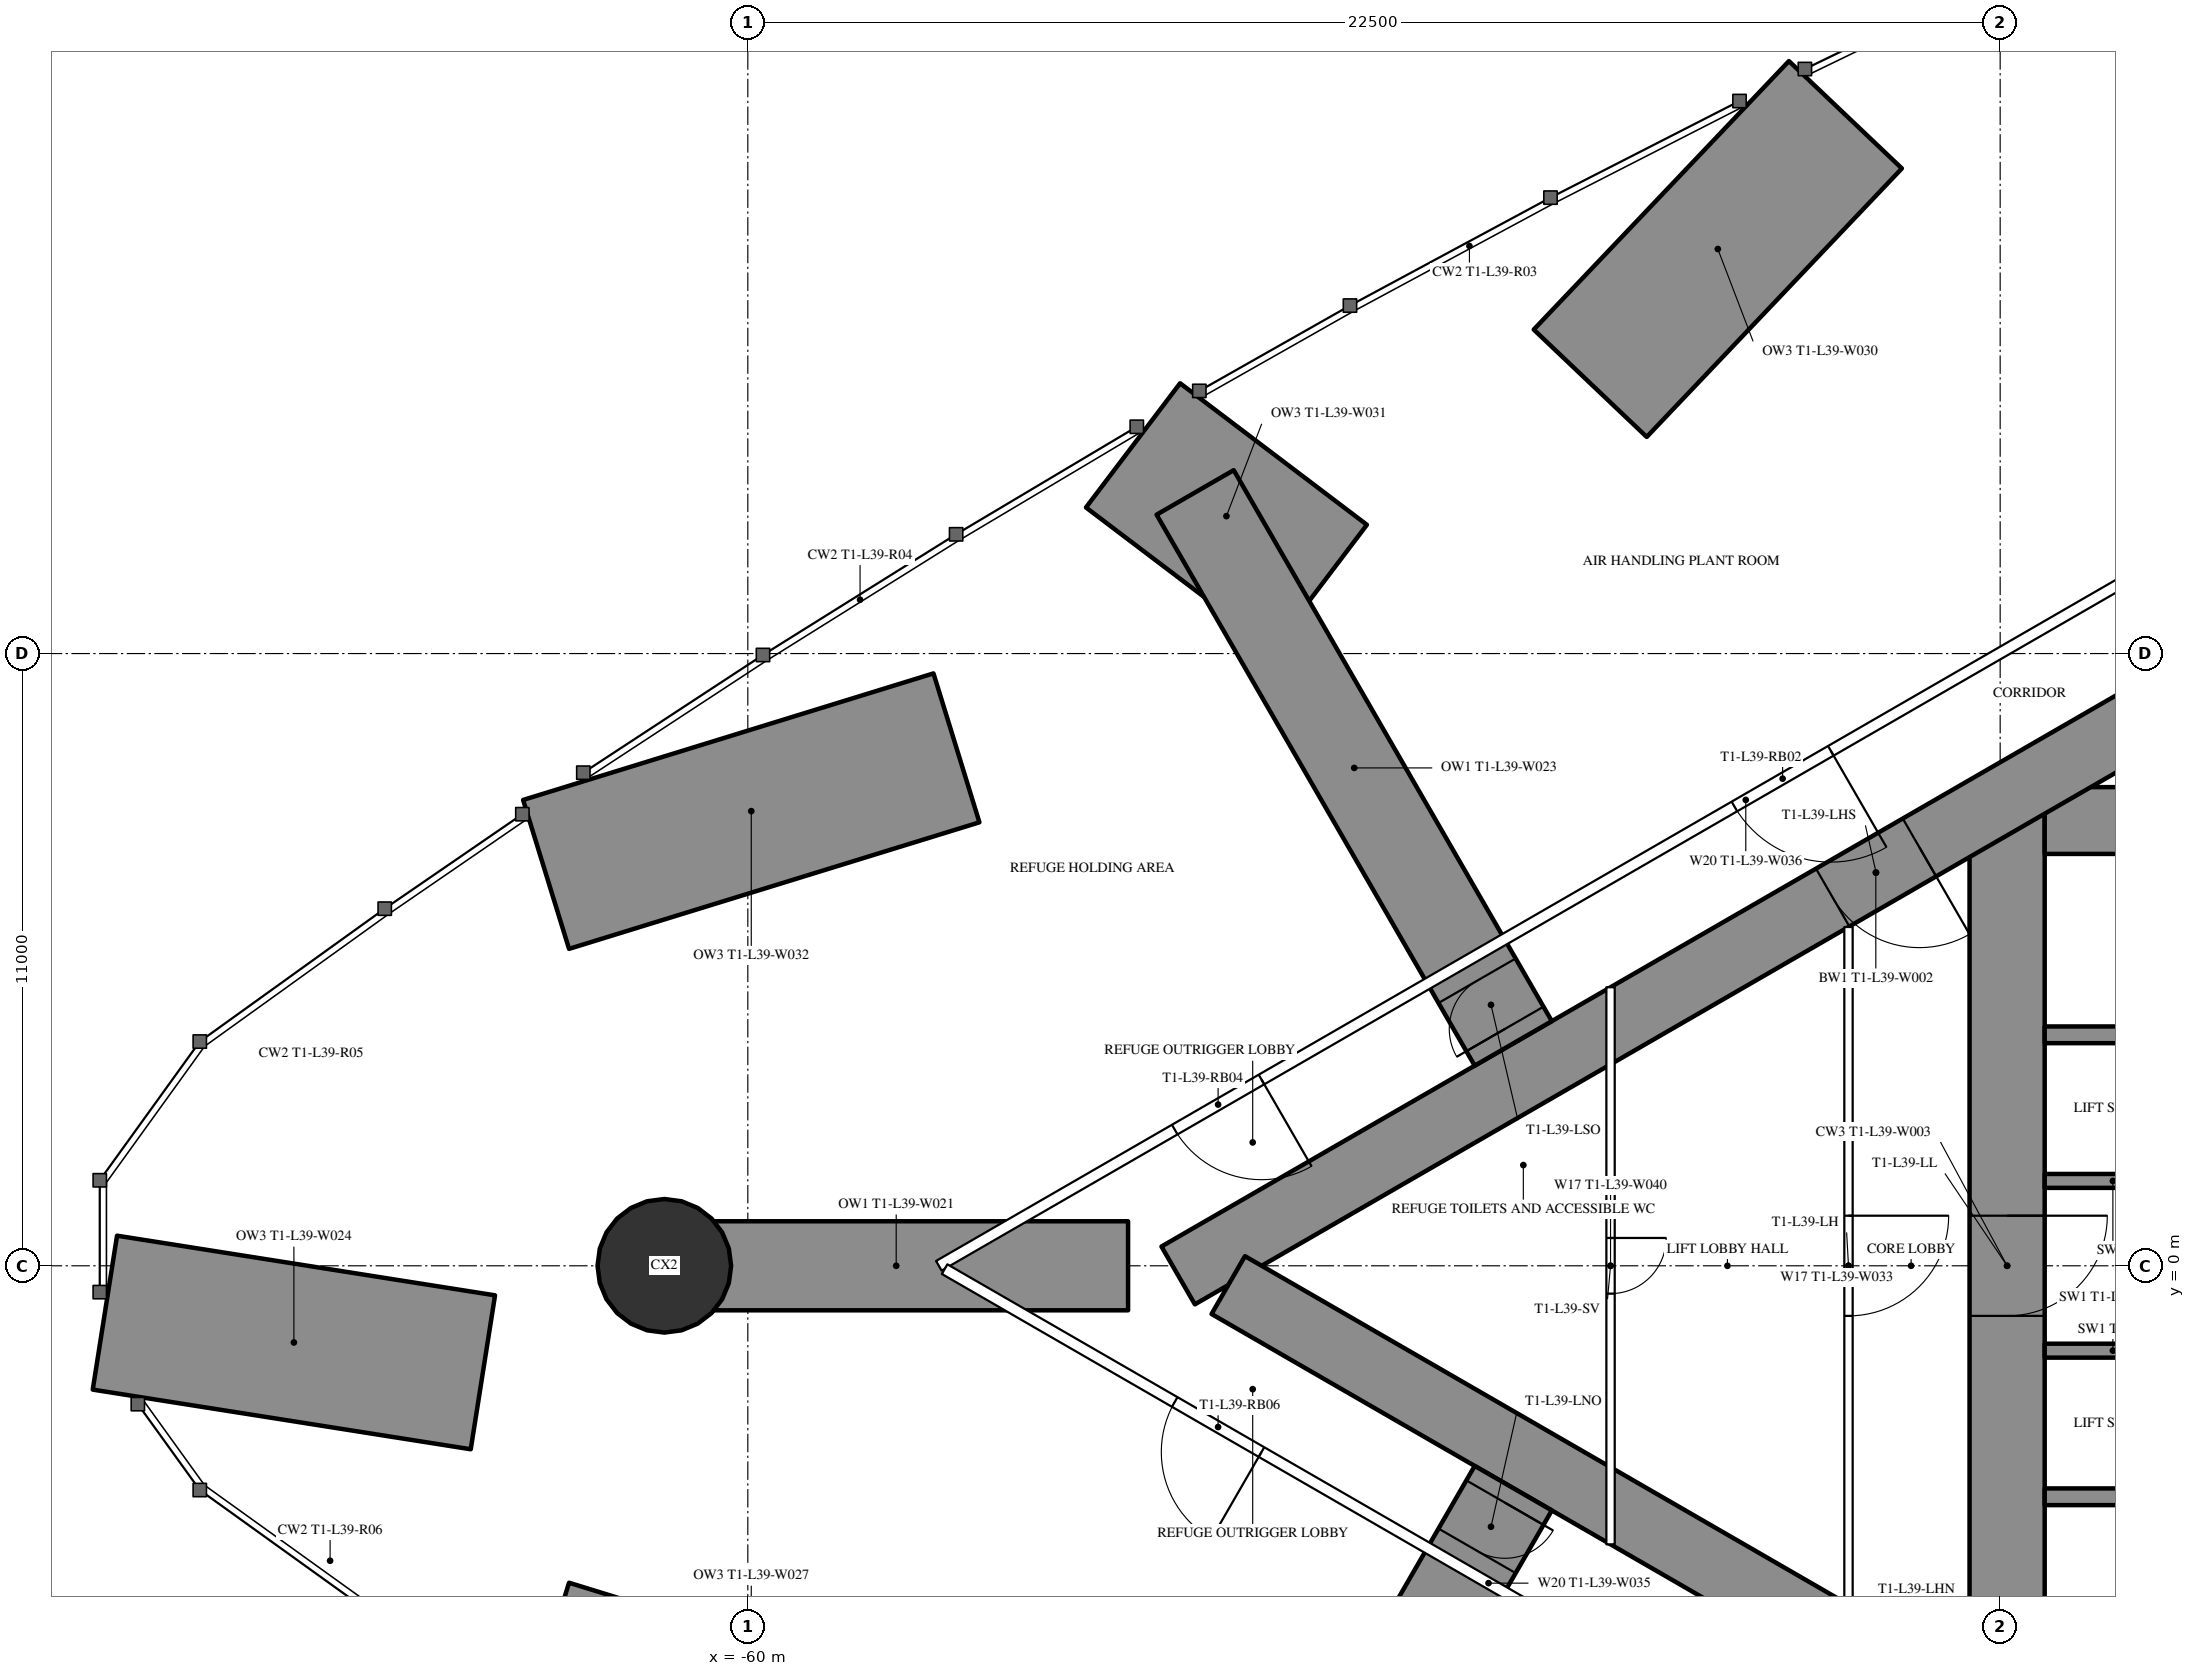
"""IFC4 building model, lengths in metres.
Left out: names, types, materials, properties, quantities, classifications, styles, units other than length and angle.
Written with IfcOpenShell. Run it as: python <this file> out.ifc"""

import sys

from ifc_helpers import new_model, si_unit, direction, frame, frame_2d, origin, origin_2d, place, context, subcontext, project, spatial, rectangle, circle, extrude, element, fill, save


model = new_model("IFC4")
c1 = context("Model", 3, precision=1e-05, world=origin(), true_north=direction((0.0, 1.0)))
c2 = subcontext(c1, "Body", "Model", "MODEL_VIEW")
j1 = project(units=[si_unit("LENGTHUNIT", "METRE"), si_unit("PLANEANGLEUNIT", "RADIAN")], contexts=[c1])
p1 = place(None, origin())
s1 = spatial("IfcSite", under=j1, at=p1, CompositionType="ELEMENT")
p2 = place(p1, origin())
s2 = spatial("IfcBuilding", under=s1, at=p2, CompositionType="ELEMENT")
p3 = place(p2, frame((0.0, 0.0, 146.7)))
s3 = spatial("IfcBuildingStorey", under=s2, at=p3, CompositionType="ELEMENT", Elevation=146.7)
p4 = place(p3, frame((-71.551, -0.842, 0.0), z_axis=(0.0, 0.0, 1.0), x_axis=(0.987774767093, -0.155887810603, 0.0)))
e1 = element("IfcWall", 1, at=p4, inside=s3, PredefinedType="SHEAR", context=c2, shape_type="SweptSolid", body=[
    extrude(rectangle(XDim=6.875, YDim=2.8, at=frame_2d((3.438, 0.0))), origin(), (0.0, 0.0, 1.0), 6.0),
])
p5 = place(p3, frame((-63.625, -7.032, 0.0), z_axis=(0.0, 0.0, 1.0), x_axis=(0.955592035737, -0.29469282522, 0.0)))
e2 = element("IfcWall", 2, at=p5, inside=s3, PredefinedType="SHEAR", context=c2, shape_type="SweptSolid", body=[
    extrude(rectangle(XDim=7.715, YDim=2.8, at=frame_2d((3.858, 0.0))), origin(), (0.0, 0.0, 1.0), 6.0),
])
p6 = place(p3, frame((-40.281, 20.681, 0.0), z_axis=(0.0, 0.0, 1.0), x_axis=(-0.688883466121, -0.724872106033, 0.0)))
e3 = element("IfcWall", 3, at=p6, inside=s3, PredefinedType="SHEAR", context=c2, shape_type="SweptSolid", body=[
    extrude(rectangle(XDim=6.655, YDim=2.8, at=frame_2d((3.328, 0.0))), origin(), (0.0, 0.0, 1.0), 6.0),
])
p7 = place(p3, frame((-53.079, 14.74, 0.0), z_axis=(0.0, 0.0, 1.0), x_axis=(0.797075233676, -0.603880014457, 0.0)))
e4 = element("IfcWall", 4, at=p7, inside=s3, PredefinedType="SHEAR", context=c2, shape_type="SweptSolid", body=[
    extrude(rectangle(XDim=4.211, YDim=2.8, at=frame_2d((2.105, 0.0))), origin(), (0.0, 0.0, 1.0), 6.0),
])
p8 = place(p3, frame((-63.625, 7.032, 0.0), z_axis=(0.0, 0.0, 1.0), x_axis=(0.955592035737, 0.29469282522, 0.0)))
e5 = element("IfcWall", 5, at=p8, inside=s3, PredefinedType="SHEAR", context=c2, shape_type="SweptSolid", body=[
    extrude(rectangle(XDim=7.715, YDim=2.8, at=frame_2d((3.858, 0.0))), origin(), (0.0, 0.0, 1.0), 6.0),
])
p9 = place(p3, frame((-61.5, 0.0, 0.0), z_axis=(0.0, 0.0, 1.0), x_axis=(1.0, 0.0, 0.0)))
e6 = element("IfcColumn", 6, at=p9, inside=s3, PredefinedType="COLUMN", context=c2, shape_type="SweptSolid", body=[
    extrude(circle(Radius=1.2, at=origin_2d()), origin(), (0.0, 0.0, 1.0), 6.0),
])
p10 = place(p3, frame((-37.375, 8.6, 0.0), z_axis=(0.0, 0.0, 1.0), x_axis=(0.0, -1.0, 0.0)))
e7 = element("IfcWall", 7, at=p10, inside=s3, PredefinedType="SHEAR", context=c2, shape_type="SweptSolid", body=[
    extrude(rectangle(XDim=17.2, YDim=1.35, at=frame_2d((8.6, 0.0))), origin(), (0.0, 0.0, 1.0), 6.0),
])
p11 = place(p10, frame((7.7, 0.0, 0.0)))
e8 = element("IfcOpeningElement", 8, at=p11, cuts=e7, PredefinedType="OPENING", context=c2, shape_type="SweptSolid", body=[
    extrude(rectangle(XDim=1.8, YDim=2.2, at=frame_2d((0.9, 1.1))), frame((0.0, 0.685, 0.0), z_axis=(0.0, -1.0, 0.0), x_axis=(1.0, 0.0, 0.0)), (0.0, 0.0, 1.0), 1.37),
])
p12 = place(p3, frame((-28.3, 8.0, 0.0), z_axis=(0.0, 0.0, 1.0), x_axis=(-1.0, 0.0, 0.0)))
e9 = element("IfcWall", 9, at=p12, inside=s3, PredefinedType="SHEAR", context=c2, shape_type="SweptSolid", body=[
    extrude(rectangle(XDim=8.4, YDim=1.2, at=frame_2d((4.2, 0.0))), origin(), (0.0, 0.0, 1.0), 6.0),
])
p13 = place(p12, frame((0.25, 0.0, 0.0)))
e10 = element("IfcOpeningElement", 10, at=p13, cuts=e9, PredefinedType="OPENING", context=c2, shape_type="SweptSolid", body=[
    extrude(rectangle(XDim=1.0, YDim=2.2, at=frame_2d((0.5, 1.1))), frame((0.0, 0.61, 0.0), z_axis=(0.0, -1.0, 0.0), x_axis=(1.0, 0.0, 0.0)), (0.0, 0.0, 1.0), 1.22),
])
for number, where, z_axis, x_axis in (
    (11, (-28.3, 4.15, 0.0), (0.0, 0.0, 1.0), (-1.0, 0.0, 0.0)),
    (12, (-28.3, -4.15, 0.0), (0.0, 0.0, 1.0), (-1.0, 0.0, 0.0)),
):
    element("IfcWall", number, at=place(p3, frame(where, z_axis=z_axis, x_axis=x_axis)), inside=s3, PredefinedType="SHEAR", context=c2, shape_type="SweptSolid", body=[
        extrude(rectangle(XDim=8.4, YDim=0.3, at=frame_2d((4.2, 0.0))), origin(), (0.0, 0.0, 1.0), 6.0),
    ])
for number, where, z_axis, x_axis in (
    (13, (-34.25, 1.525, 0.0), (0.0, 0.0, 1.0), (-1.0, 0.0, 0.0)),
    (14, (-34.25, -1.525, 0.0), (0.0, 0.0, 1.0), (-1.0, 0.0, 0.0)),
):
    element("IfcWall", number, at=place(p3, frame(where, z_axis=z_axis, x_axis=x_axis)), inside=s3, PredefinedType="SHEAR", context=c2, shape_type="SweptSolid", body=[
        extrude(rectangle(XDim=2.45, YDim=0.25, at=frame_2d((1.225, 0.0))), origin(), (0.0, 0.0, 1.0), 6.0),
    ])
p14 = place(p3, frame((-27.2, 14.3, 0.0), z_axis=(0.0, 0.0, 1.0), x_axis=(-0.866026593062, -0.499997940104, 0.0)))
e15 = element("IfcWall", 15, at=p14, inside=s3, PredefinedType="SHEAR", context=c2, shape_type="SweptSolid", body=[
    extrude(rectangle(XDim=28.946, YDim=1.2, at=frame_2d((14.473, 0.0))), origin(), (0.0, 0.0, 1.0), 6.0),
])
p15 = place(p14, frame((4.6, 0.0, 0.0)))
e16 = element("IfcOpeningElement", 16, at=p15, cuts=e15, PredefinedType="OPENING", context=c2, shape_type="SweptSolid", body=[
    extrude(rectangle(XDim=1.0, YDim=2.2, at=frame_2d((0.5, 1.1))), frame((0.0, 0.61, 0.0), z_axis=(0.0, -1.0, 0.0), x_axis=(1.0, 0.0, 0.0)), (0.0, 0.0, 1.0), 1.22),
])
p16 = place(p14, frame((13.568, 0.0, 0.0)))
e17 = element("IfcOpeningElement", 17, at=p16, cuts=e15, PredefinedType="OPENING", context=c2, shape_type="SweptSolid", body=[
    extrude(rectangle(XDim=1.8, YDim=2.2, at=frame_2d((0.9, 1.1))), frame((0.0, 0.61, 0.0), z_axis=(0.0, -1.0, 0.0), x_axis=(1.0, 0.0, 0.0)), (0.0, 0.0, 1.0), 1.22),
])
p17 = place(p3, frame((-27.2, -14.3, 0.0), z_axis=(0.0, 0.0, 1.0), x_axis=(-0.866024021859, 0.500002393557, 0.0)))
e18 = element("IfcWall", 18, at=p17, inside=s3, PredefinedType="SHEAR", context=c2, shape_type="SweptSolid", body=[
    extrude(rectangle(XDim=27.907, YDim=1.2, at=frame_2d((13.954, 0.0))), origin(), (0.0, 0.0, 1.0), 6.0),
])
p18 = place(p17, frame((4.6, 0.0, 0.0)))
e19 = element("IfcOpeningElement", 19, at=p18, cuts=e18, PredefinedType="OPENING", context=c2, shape_type="SweptSolid", body=[
    extrude(rectangle(XDim=1.0, YDim=2.2, at=frame_2d((0.5, 1.1))), frame((0.0, 0.61, 0.0), z_axis=(0.0, -1.0, 0.0), x_axis=(1.0, 0.0, 0.0)), (0.0, 0.0, 1.0), 1.22),
])
p19 = place(p17, frame((13.568, 0.0, 0.0)))
e20 = element("IfcOpeningElement", 20, at=p19, cuts=e18, PredefinedType="OPENING", context=c2, shape_type="SweptSolid", body=[
    extrude(rectangle(XDim=1.8, YDim=2.2, at=frame_2d((0.9, 1.1))), frame((0.0, 0.61, 0.0), z_axis=(0.0, -1.0, 0.0), x_axis=(1.0, 0.0, 0.0)), (0.0, 0.0, 1.0), 1.22),
])
p20 = place(p3, frame((-46.248, 3.996, 0.0), z_axis=(0.0, 0.0, 1.0), x_axis=(-0.499993613132, 0.866029091213, 0.0)))
e21 = element("IfcWall", 21, at=p20, inside=s3, PredefinedType="SHEAR", context=c2, shape_type="SweptSolid", body=[
    extrude(rectangle(XDim=11.431, YDim=1.6, at=frame_2d((5.715, 0.0))), origin(), (0.0, 0.0, 1.0), 6.0),
])
p21 = place(p20, frame((0.3, 0.0, 0.0)))
e22 = element("IfcOpeningElement", 22, at=p21, cuts=e21, PredefinedType="OPENING", context=c2, shape_type="SweptSolid", body=[
    extrude(rectangle(XDim=1.0, YDim=2.2, at=frame_2d((0.5, 1.1))), frame((0.0, 0.81, 0.0), z_axis=(0.0, -1.0, 0.0), x_axis=(1.0, 0.0, 0.0)), (0.0, 0.0, 1.0), 1.62),
])
p22 = place(p3, frame((-53.168, 0.0, 0.0), z_axis=(0.0, 0.0, 1.0), x_axis=(-1.0, 0.0, 0.0)))
e23 = element("IfcWall", 23, at=p22, inside=s3, PredefinedType="SHEAR", context=c2, shape_type="SweptSolid", body=[
    extrude(rectangle(XDim=8.332, YDim=1.6, at=frame_2d((4.166, 0.0))), origin(), (0.0, 0.0, 1.0), 6.0),
])
p23 = place(p3, frame((-46.248, -3.996, 0.0), z_axis=(0.0, 0.0, 1.0), x_axis=(-0.499993613132, -0.866029091213, 0.0)))
e24 = element("IfcWall", 24, at=p23, inside=s3, PredefinedType="SHEAR", context=c2, shape_type="SweptSolid", body=[
    extrude(rectangle(XDim=11.431, YDim=1.6, at=frame_2d((5.715, 0.0))), origin(), (0.0, 0.0, 1.0), 6.0),
])
p24 = place(p23, frame((0.3, 0.0, 0.0)))
e25 = element("IfcOpeningElement", 25, at=p24, cuts=e24, PredefinedType="OPENING", context=c2, shape_type="SweptSolid", body=[
    extrude(rectangle(XDim=1.0, YDim=2.2, at=frame_2d((0.5, 1.1))), frame((0.0, 0.81, 0.0), z_axis=(0.0, -1.0, 0.0), x_axis=(1.0, 0.0, 0.0)), (0.0, 0.0, 1.0), 1.62),
])
p25 = place(p3, frame((-27.572, 16.741, 0.0), z_axis=(0.0, 0.0, 1.0), x_axis=(-0.866026395587, -0.499998282143, 0.0)))
e26 = element("IfcWall", 26, at=p25, inside=s3, PredefinedType="PARTITIONING", context=c2, shape_type="SweptSolid", body=[
    extrude(rectangle(XDim=33.482, YDim=0.2, at=frame_2d((16.741, 0.0))), origin(), (0.0, 0.0, 1.0), 5.75),
])
p26 = place(p25, frame((4.354, 0.0, 0.0)))
e27 = element("IfcOpeningElement", 27, at=p26, cuts=e26, PredefinedType="OPENING", context=c2, shape_type="SweptSolid", body=[
    extrude(rectangle(XDim=1.8, YDim=2.2, at=frame_2d((0.9, 1.1))), frame((0.0, 0.11, 0.0), z_axis=(0.0, -1.0, 0.0), x_axis=(1.0, 0.0, 0.0)), (0.0, 0.0, 1.0), 0.22),
])
p27 = place(p25, frame((14.977, 0.0, 0.0)))
e28 = element("IfcOpeningElement", 28, at=p27, cuts=e26, PredefinedType="OPENING", context=c2, shape_type="SweptSolid", body=[
    extrude(rectangle(XDim=2.0, YDim=2.4, at=frame_2d((1.0, 1.2))), frame((0.0, 0.11, 0.0), z_axis=(0.0, -1.0, 0.0), x_axis=(1.0, 0.0, 0.0)), (0.0, 0.0, 1.0), 0.22),
])
p28 = place(p25, frame((26.788, 0.0, 0.0)))
e29 = element("IfcOpeningElement", 29, at=p28, cuts=e26, PredefinedType="OPENING", context=c2, shape_type="SweptSolid", body=[
    extrude(rectangle(XDim=1.8, YDim=2.2, at=frame_2d((0.9, 1.1))), frame((0.0, 0.11, 0.0), z_axis=(0.0, -1.0, 0.0), x_axis=(1.0, 0.0, 0.0)), (0.0, 0.0, 1.0), 0.22),
])
p29 = place(p3, frame((-36.92, -11.344, 0.0), z_axis=(0.0, 0.0, 1.0), x_axis=(-0.866028313256, 0.499994960614, 0.0)))
e30 = element("IfcWall", 30, at=p29, inside=s3, PredefinedType="PARTITIONING", context=c2, shape_type="SweptSolid", body=[
    extrude(rectangle(XDim=22.568, YDim=0.2, at=frame_2d((11.284, 0.0))), origin(), (0.0, 0.0, 1.0), 5.75),
])
p30 = place(p29, frame((15.994, 0.0, 0.0)))
e31 = element("IfcOpeningElement", 31, at=p30, cuts=e30, PredefinedType="OPENING", context=c2, shape_type="SweptSolid", body=[
    extrude(rectangle(XDim=1.8, YDim=2.2, at=frame_2d((0.9, 1.1))), frame((0.0, 0.11, 0.0), z_axis=(0.0, -1.0, 0.0), x_axis=(1.0, 0.0, 0.0)), (0.0, 0.0, 1.0), 0.22),
])
p31 = place(p29, frame((4.651, 0.0, 0.0)))
e32 = element("IfcOpeningElement", 32, at=p31, cuts=e30, PredefinedType="OPENING", context=c2, shape_type="SweptSolid", body=[
    extrude(rectangle(XDim=1.8, YDim=2.2, at=frame_2d((0.9, 1.1))), frame((0.0, 0.11, 0.0), z_axis=(0.0, -1.0, 0.0), x_axis=(1.0, 0.0, 0.0)), (0.0, 0.0, 1.0), 0.22),
])
p32 = place(p3, frame((-40.225, 6.087, 0.0), z_axis=(0.0, 0.0, 1.0), x_axis=(0.0, -1.0, 0.0)))
e33 = element("IfcWall", 33, at=p32, inside=s3, PredefinedType="PARTITIONING", context=c2, shape_type="SweptSolid", body=[
    extrude(rectangle(XDim=12.174, YDim=0.15, at=frame_2d((6.087, 0.0))), origin(), (0.0, 0.0, 1.0), 5.75),
])
p33 = place(p32, frame((5.187, 0.0, 0.0)))
e34 = element("IfcOpeningElement", 34, at=p33, cuts=e33, PredefinedType="OPENING", context=c2, shape_type="SweptSolid", body=[
    extrude(rectangle(XDim=1.8, YDim=2.2, at=frame_2d((0.9, 1.1))), frame((0.0, 0.085, 0.0), z_axis=(0.0, -1.0, 0.0), x_axis=(1.0, 0.0, 0.0)), (0.0, 0.0, 1.0), 0.17),
])
p34 = place(p3, frame((-44.5, 5.005, 0.0), z_axis=(0.0, 0.0, 1.0), x_axis=(0.0, -1.0, 0.0)))
e35 = element("IfcWall", 35, at=p34, inside=s3, PredefinedType="PARTITIONING", context=c2, shape_type="SweptSolid", body=[
    extrude(rectangle(XDim=10.009, YDim=0.15, at=frame_2d((5.005, 0.0))), origin(), (0.0, 0.0, 1.0), 5.75),
])
p35 = place(p34, frame((4.505, 0.0, 0.0)))
e36 = element("IfcOpeningElement", 36, at=p35, cuts=e35, PredefinedType="OPENING", context=c2, shape_type="SweptSolid", body=[
    extrude(rectangle(XDim=1.0, YDim=2.2, at=frame_2d((0.5, 1.1))), frame((0.0, 0.085, 0.0), z_axis=(0.0, -1.0, 0.0), x_axis=(1.0, 0.0, 0.0)), (0.0, 0.0, 1.0), 0.17),
])
p36 = place(p21, origin())
e37 = element("IfcDoor", 37, at=p36, inside=s3, OperationType="SINGLE_SWING_LEFT", PredefinedType="DOOR", context=c2, shape_type="SweptSolid", body=[
    extrude(rectangle(XDim=1.0, YDim=2.2, at=frame_2d((0.5, 1.1))), frame((0.0, 0.025, 0.0), z_axis=(0.0, -1.0, 0.0), x_axis=(1.0, 0.0, 0.0)), (0.0, 0.0, 1.0), 0.05),
])
fill(e22, e37)
p37 = place(p24, origin())
e38 = element("IfcDoor", 38, at=p37, inside=s3, OperationType="SINGLE_SWING_LEFT", PredefinedType="DOOR", context=c2, shape_type="SweptSolid", body=[
    extrude(rectangle(XDim=1.0, YDim=2.2, at=frame_2d((0.5, 1.1))), frame((0.0, 0.025, 0.0), z_axis=(0.0, -1.0, 0.0), x_axis=(1.0, 0.0, 0.0)), (0.0, 0.0, 1.0), 0.05),
])
fill(e25, e38)
p38 = place(p27, origin())
e39 = element("IfcDoor", 39, at=p38, inside=s3, OperationType="DOUBLE_DOOR_SINGLE_SWING", PredefinedType="DOOR", context=c2, shape_type="SweptSolid", body=[
    extrude(rectangle(XDim=2.0, YDim=2.4, at=frame_2d((1.0, 1.2))), frame((0.0, 0.025, 0.0), z_axis=(0.0, -1.0, 0.0), x_axis=(1.0, 0.0, 0.0)), (0.0, 0.0, 1.0), 0.05),
])
fill(e28, e39)
p39 = place(p28, origin())
e40 = element("IfcDoor", 40, at=p39, inside=s3, OperationType="DOUBLE_DOOR_SINGLE_SWING", PredefinedType="DOOR", context=c2, shape_type="SweptSolid", body=[
    extrude(rectangle(XDim=1.8, YDim=2.2, at=frame_2d((0.9, 1.1))), frame((0.0, 0.025, 0.0), z_axis=(0.0, -1.0, 0.0), x_axis=(1.0, 0.0, 0.0)), (0.0, 0.0, 1.0), 0.05),
])
fill(e29, e40)
p40 = place(p30, origin())
e41 = element("IfcDoor", 41, at=p40, inside=s3, OperationType="DOUBLE_DOOR_SINGLE_SWING", PredefinedType="DOOR", context=c2, shape_type="SweptSolid", body=[
    extrude(rectangle(XDim=1.8, YDim=2.2, at=frame_2d((0.9, 1.1))), frame((0.0, 0.025, 0.0), z_axis=(0.0, -1.0, 0.0), x_axis=(1.0, 0.0, 0.0)), (0.0, 0.0, 1.0), 0.05),
])
fill(e31, e41)
p41 = place(p33, origin())
e42 = element("IfcDoor", 42, at=p41, inside=s3, OperationType="DOUBLE_DOOR_SINGLE_SWING", PredefinedType="DOOR", context=c2, shape_type="SweptSolid", body=[
    extrude(rectangle(XDim=1.8, YDim=2.2, at=frame_2d((0.9, 1.1))), frame((0.0, 0.025, 0.0), z_axis=(0.0, -1.0, 0.0), x_axis=(1.0, 0.0, 0.0)), (0.0, 0.0, 1.0), 0.05),
])
fill(e34, e42)
p42 = place(p35, origin())
e43 = element("IfcDoor", 43, at=p42, inside=s3, OperationType="SINGLE_SWING_LEFT", PredefinedType="DOOR", context=c2, shape_type="SweptSolid", body=[
    extrude(rectangle(XDim=1.0, YDim=2.2, at=frame_2d((0.5, 1.1))), frame((0.0, 0.025, 0.0), z_axis=(0.0, -1.0, 0.0), x_axis=(1.0, 0.0, 0.0)), (0.0, 0.0, 1.0), 0.05),
])
fill(e36, e43)
p43 = place(p16, origin())
e44 = element("IfcDoor", 44, at=p43, inside=s3, OperationType="DOUBLE_DOOR_SINGLE_SWING", PredefinedType="DOOR", context=c2, shape_type="SweptSolid", body=[
    extrude(rectangle(XDim=1.8, YDim=2.2, at=frame_2d((0.9, 1.1))), frame((0.0, 0.025, 0.0), z_axis=(0.0, -1.0, 0.0), x_axis=(1.0, 0.0, 0.0)), (0.0, 0.0, 1.0), 0.05),
])
fill(e17, e44)
p44 = place(p11, origin())
e45 = element("IfcDoor", 45, at=p44, inside=s3, OperationType="DOUBLE_DOOR_SINGLE_SWING", PredefinedType="DOOR", context=c2, shape_type="SweptSolid", body=[
    extrude(rectangle(XDim=1.8, YDim=2.2, at=frame_2d((0.9, 1.1))), frame((0.0, 0.025, 0.0), z_axis=(0.0, -1.0, 0.0), x_axis=(1.0, 0.0, 0.0)), (0.0, 0.0, 1.0), 0.05),
])
fill(e8, e45)
save(model, sys.argv[1])
